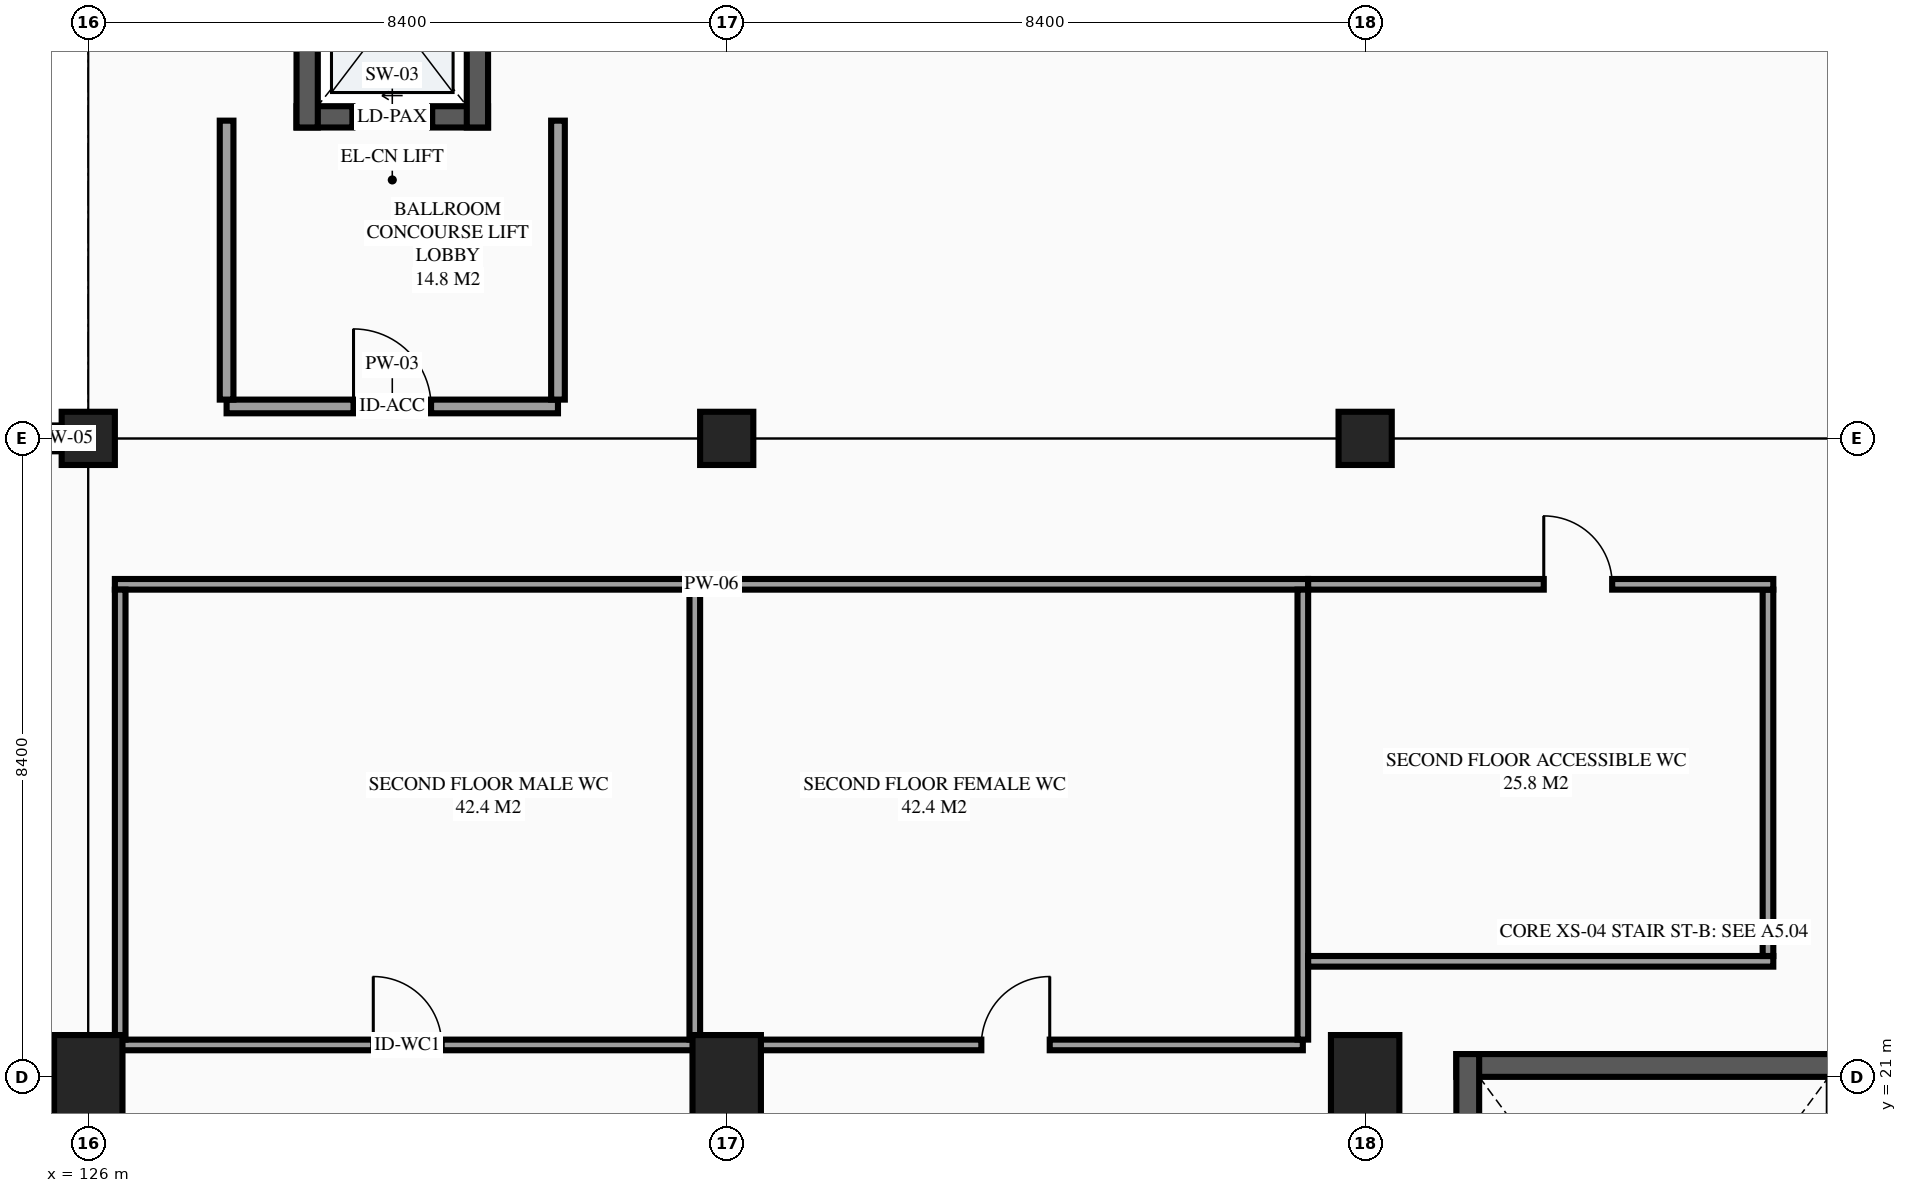
"""IFC4 building model, lengths in metres.
Left out: names, types, materials, properties, quantities, classifications, styles, units other than length and angle.
Written with IfcOpenShell. Run it as: python <this file> out.ifc"""

import sys

from ifc_helpers import new_model, si_unit, direction, frame, frame_2d, origin, origin_2d, place, context, subcontext, project, spatial, rectangle, extrude, element, fill, save


model = new_model("IFC4")
c1 = context("Model", 3, precision=1e-05, world=origin(), true_north=direction((0.0, 1.0)))
c2 = subcontext(c1, "Body", "Model", "MODEL_VIEW")
j1 = project(units=[si_unit("LENGTHUNIT", "METRE"), si_unit("PLANEANGLEUNIT", "RADIAN")], contexts=[c1])
p1 = place(None, origin())
s1 = spatial("IfcSite", under=j1, at=p1, CompositionType="ELEMENT")
p2 = place(p1, origin())
s2 = spatial("IfcBuilding", under=s1, at=p2, CompositionType="ELEMENT")
p3 = place(p2, frame((0.0, 0.0, 9.9)))
s3 = spatial("IfcBuildingStorey", under=s2, at=p3, CompositionType="ELEMENT", Elevation=9.9)
p4 = place(p3, frame((126.0, 21.0, 0.0), z_axis=(0.0, 0.0, 1.0), x_axis=(1.0, 0.0, 0.0)))
e1 = element("IfcColumn", 1, at=p4, inside=s3, PredefinedType="COLUMN", context=c2, shape_type="SweptSolid", body=[
    extrude(rectangle(XDim=0.9, YDim=1.1, at=origin_2d()), origin(), (0.0, 0.0, 1.0), 4.2),
])
p5 = place(p3, frame((126.0, 29.4, 0.0), z_axis=(0.0, 0.0, 1.0), x_axis=(1.0, 0.0, 0.0)))
e2 = element("IfcColumn", 2, at=p5, inside=s3, PredefinedType="COLUMN", context=c2, shape_type="SweptSolid", body=[
    extrude(rectangle(XDim=0.7, YDim=0.7, at=origin_2d()), origin(), (0.0, 0.0, 1.0), 4.2),
])
p6 = place(p3, frame((134.4, 21.0, 0.0), z_axis=(0.0, 0.0, 1.0), x_axis=(1.0, 0.0, 0.0)))
e3 = element("IfcColumn", 3, at=p6, inside=s3, PredefinedType="COLUMN", context=c2, shape_type="SweptSolid", body=[
    extrude(rectangle(XDim=0.9, YDim=1.1, at=origin_2d()), origin(), (0.0, 0.0, 1.0), 4.2),
])
p7 = place(p3, frame((134.4, 29.4, 0.0), z_axis=(0.0, 0.0, 1.0), x_axis=(1.0, 0.0, 0.0)))
e4 = element("IfcColumn", 4, at=p7, inside=s3, PredefinedType="COLUMN", context=c2, shape_type="SweptSolid", body=[
    extrude(rectangle(XDim=0.7, YDim=0.7, at=origin_2d()), origin(), (0.0, 0.0, 1.0), 4.2),
])
p8 = place(p3, frame((142.8, 21.0, 0.0), z_axis=(0.0, 0.0, 1.0), x_axis=(1.0, 0.0, 0.0)))
e5 = element("IfcColumn", 5, at=p8, inside=s3, PredefinedType="COLUMN", context=c2, shape_type="SweptSolid", body=[
    extrude(rectangle(XDim=0.9, YDim=1.1, at=origin_2d()), origin(), (0.0, 0.0, 1.0), 4.2),
])
p9 = place(p3, frame((142.8, 29.4, 0.0), z_axis=(0.0, 0.0, 1.0), x_axis=(1.0, 0.0, 0.0)))
e6 = element("IfcColumn", 6, at=p9, inside=s3, PredefinedType="COLUMN", context=c2, shape_type="SweptSolid", body=[
    extrude(rectangle(XDim=0.7, YDim=0.7, at=origin_2d()), origin(), (0.0, 0.0, 1.0), 4.2),
])
p10 = place(p3, frame((126.0, 29.4, 0.0), z_axis=(0.0, 0.0, 1.0), x_axis=(-1.0, 0.0, 0.0)))
e7 = element("IfcWall", 7, at=p10, inside=s3, PredefinedType="STANDARD", context=c2, shape_type="SweptSolid", body=[
    extrude(rectangle(XDim=0.6, YDim=0.34, at=frame_2d((0.3, 0.0))), origin(), (0.0, 0.0, 1.0), 4.2),
])
p11 = place(p3, frame((128.74, 33.63, 0.0), z_axis=(0.0, 0.0, 1.0), x_axis=(1.0, 0.0, 0.0)))
e8 = element("IfcWall", 8, at=p11, inside=s3, PredefinedType="SHEAR", context=c2, shape_type="SweptSolid", body=[
    extrude(rectangle(XDim=2.52, YDim=0.28, at=frame_2d((1.26, 0.0))), origin(), (0.0, 0.0, 1.0), 4.2),
])
p12 = place(p11, frame((0.735, 0.0, 0.0)))
e9 = element("IfcOpeningElement", 9, at=p12, cuts=e8, PredefinedType="OPENING", context=c2, shape_type="SweptSolid", body=[
    extrude(rectangle(XDim=1.05, YDim=2.2, at=frame_2d((0.525, 1.1))), frame((0.0, 0.15, 0.0), z_axis=(0.0, -1.0, 0.0), x_axis=(1.0, 0.0, 0.0)), (0.0, 0.0, 1.0), 0.3),
])
for number, where, z_axis, x_axis in (
    (10, (131.12, 33.49, 0.0), (0.0, 0.0, 1.0), (0.0, 1.0, 0.0)),
    (11, (128.88, 36.51, 0.0), (0.0, 0.0, 1.0), (0.0, -1.0, 0.0)),
):
    element("IfcWall", number, at=place(p3, frame(where, z_axis=z_axis, x_axis=x_axis)), inside=s3, PredefinedType="SHEAR", context=c2, shape_type="SweptSolid", body=[
        extrude(rectangle(XDim=3.02, YDim=0.28, at=frame_2d((1.51, 0.0))), origin(), (0.0, 0.0, 1.0), 4.2),
    ])
p13 = place(p3, frame((149.2, 21.15, 0.0), z_axis=(0.0, 0.0, 1.0), x_axis=(-1.0, 0.0, 0.0)))
e12 = element("IfcWall", 12, at=p13, inside=s3, PredefinedType="SHEAR", context=c2, shape_type="SweptSolid", body=[
    extrude(rectangle(XDim=5.2, YDim=0.3, at=frame_2d((2.6, 0.0))), origin(), (0.0, 0.0, 1.0), 4.2),
])
p14 = place(p3, frame((144.15, 21.3, 0.0), z_axis=(0.0, 0.0, 1.0), x_axis=(0.0, -1.0, 0.0)))
e13 = element("IfcWall", 13, at=p14, inside=s3, PredefinedType="SHEAR", context=c2, shape_type="SweptSolid", body=[
    extrude(rectangle(XDim=8.84, YDim=0.3, at=frame_2d((4.42, 0.0))), origin(), (0.0, 0.0, 1.0), 4.2),
])
p15 = place(p3, frame((126.35, 27.48, 0.0), z_axis=(0.0, 0.0, 1.0), x_axis=(1.0, 0.0, 0.0)))
e14 = element("IfcWall", 14, at=p15, inside=s3, PredefinedType="PARTITIONING", context=c2, shape_type="SweptSolid", body=[
    extrude(rectangle(XDim=15.7, YDim=0.14, at=frame_2d((7.85, 0.0))), origin(), (0.0, 0.0, 1.0), 3.955),
])
p16 = place(p3, frame((127.82, 29.82, 0.0), z_axis=(0.0, 0.0, 1.0), x_axis=(1.0, 0.0, 0.0)))
e15 = element("IfcWall", 15, at=p16, inside=s3, PredefinedType="PARTITIONING", context=c2, shape_type="SweptSolid", body=[
    extrude(rectangle(XDim=4.36, YDim=0.18, at=frame_2d((2.18, 0.0))), origin(), (0.0, 0.0, 1.0), 3.955),
])
p17 = place(p16, frame((1.67, 0.0, 0.0)))
e16 = element("IfcOpeningElement", 16, at=p17, cuts=e15, PredefinedType="OPENING", context=c2, shape_type="SweptSolid", body=[
    extrude(rectangle(XDim=1.02, YDim=2.15, at=frame_2d((0.51, 1.075))), frame((0.0, 0.1, 0.0), z_axis=(0.0, -1.0, 0.0), x_axis=(1.0, 0.0, 0.0)), (0.0, 0.0, 1.0), 0.2),
])
for number, where, z_axis, x_axis in (
    (17, (127.82, 29.91, 0.0), (0.0, 0.0, 1.0), (0.0, 1.0, 0.0)),
    (18, (132.18, 29.91, 0.0), (0.0, 0.0, 1.0), (0.0, 1.0, 0.0)),
):
    element("IfcWall", number, at=place(p3, frame(where, z_axis=z_axis, x_axis=x_axis)), inside=s3, PredefinedType="PARTITIONING", context=c2, shape_type="SweptSolid", body=[
        extrude(rectangle(XDim=3.67, YDim=0.18, at=frame_2d((1.835, 0.0))), origin(), (0.0, 0.0, 1.0), 3.955),
    ])
p18 = place(p3, frame((126.42, 21.42, 0.0), z_axis=(0.0, 0.0, 1.0), x_axis=(1.0, 0.0, 0.0)))
e19 = element("IfcWall", 19, at=p18, inside=s3, PredefinedType="PARTITIONING", context=c2, shape_type="SweptSolid", body=[
    extrude(rectangle(XDim=7.56, YDim=0.14, at=frame_2d((3.78, 0.0))), origin(), (0.0, 0.0, 1.0), 3.955),
])
p19 = place(p18, frame((3.33, 0.0, 0.0)))
e20 = element("IfcOpeningElement", 20, at=p19, cuts=e19, PredefinedType="OPENING", context=c2, shape_type="SweptSolid", body=[
    extrude(rectangle(XDim=0.9, YDim=2.12, at=frame_2d((0.45, 1.06))), frame((0.0, 0.08, 0.0), z_axis=(0.0, -1.0, 0.0), x_axis=(1.0, 0.0, 0.0)), (0.0, 0.0, 1.0), 0.16),
])
for number, where, z_axis, x_axis in (
    (21, (126.42, 21.49, 0.0), (0.0, 0.0, 1.0), (0.0, 1.0, 0.0)),
    (22, (133.98, 21.49, 0.0), (0.0, 0.0, 1.0), (0.0, 1.0, 0.0)),
):
    element("IfcWall", number, at=place(p3, frame(where, z_axis=z_axis, x_axis=x_axis)), inside=s3, PredefinedType="PARTITIONING", context=c2, shape_type="SweptSolid", body=[
        extrude(rectangle(XDim=5.92, YDim=0.14, at=frame_2d((2.96, 0.0))), origin(), (0.0, 0.0, 1.0), 3.955),
    ])
p20 = place(p3, frame((134.42, 21.42, 0.0), z_axis=(0.0, 0.0, 1.0), x_axis=(1.0, 0.0, 0.0)))
e23 = element("IfcWall", 23, at=p20, inside=s3, PredefinedType="PARTITIONING", context=c2, shape_type="SweptSolid", body=[
    extrude(rectangle(XDim=7.56, YDim=0.14, at=frame_2d((3.78, 0.0))), origin(), (0.0, 0.0, 1.0), 3.955),
])
p21 = place(p20, frame((3.33, 0.0, 0.0)))
e24 = element("IfcOpeningElement", 24, at=p21, cuts=e23, PredefinedType="OPENING", context=c2, shape_type="SweptSolid", body=[
    extrude(rectangle(XDim=0.9, YDim=2.12, at=frame_2d((0.45, 1.06))), frame((0.0, 0.08, 0.0), z_axis=(0.0, -1.0, 0.0), x_axis=(1.0, 0.0, 0.0)), (0.0, 0.0, 1.0), 0.16),
])
p22 = place(p3, frame((141.98, 21.49, 0.0), z_axis=(0.0, 0.0, 1.0), x_axis=(0.0, 1.0, 0.0)))
e25 = element("IfcWall", 25, at=p22, inside=s3, PredefinedType="PARTITIONING", context=c2, shape_type="SweptSolid", body=[
    extrude(rectangle(XDim=5.92, YDim=0.14, at=frame_2d((2.96, 0.0))), origin(), (0.0, 0.0, 1.0), 3.955),
])
p23 = place(p3, frame((142.05, 22.52, 0.0), z_axis=(0.0, 0.0, 1.0), x_axis=(1.0, 0.0, 0.0)))
e26 = element("IfcWall", 26, at=p23, inside=s3, PredefinedType="PARTITIONING", context=c2, shape_type="SweptSolid", body=[
    extrude(rectangle(XDim=6.12, YDim=0.14, at=frame_2d((3.06, 0.0))), origin(), (0.0, 0.0, 1.0), 3.955),
])
p24 = place(p3, frame((148.1, 22.59, 0.0), z_axis=(0.0, 0.0, 1.0), x_axis=(0.0, 1.0, 0.0)))
e27 = element("IfcWall", 27, at=p24, inside=s3, PredefinedType="PARTITIONING", context=c2, shape_type="SweptSolid", body=[
    extrude(rectangle(XDim=4.82, YDim=0.14, at=frame_2d((2.41, 0.0))), origin(), (0.0, 0.0, 1.0), 3.955),
])
p25 = place(p3, frame((142.05, 27.48, 0.0), z_axis=(0.0, 0.0, 1.0), x_axis=(1.0, 0.0, 0.0)))
e28 = element("IfcWall", 28, at=p25, inside=s3, PredefinedType="PARTITIONING", context=c2, shape_type="SweptSolid", body=[
    extrude(rectangle(XDim=6.12, YDim=0.14, at=frame_2d((3.06, 0.0))), origin(), (0.0, 0.0, 1.0), 3.955),
])
p26 = place(p25, frame((3.1, 0.0, 0.0)))
e29 = element("IfcOpeningElement", 29, at=p26, cuts=e28, PredefinedType="OPENING", context=c2, shape_type="SweptSolid", body=[
    extrude(rectangle(XDim=0.9, YDim=2.12, at=frame_2d((0.45, 1.06))), frame((0.0, 0.08, 0.0), z_axis=(0.0, -1.0, 0.0), x_axis=(1.0, 0.0, 0.0)), (0.0, 0.0, 1.0), 0.16),
])
p27 = place(p12, origin())
e30 = element("IfcDoor", 30, at=p27, inside=s3, OperationType="SLIDING_TO_LEFT", PredefinedType="DOOR", context=c2, shape_type="SweptSolid", body=[
    extrude(rectangle(XDim=1.05, YDim=2.2, at=frame_2d((0.525, 1.1))), frame((0.0, 0.025, 0.0), z_axis=(0.0, -1.0, 0.0), x_axis=(1.0, 0.0, 0.0)), (0.0, 0.0, 1.0), 0.05),
])
fill(e9, e30)
p28 = place(p17, origin())
e31 = element("IfcDoor", 31, at=p28, inside=s3, OperationType="SINGLE_SWING_LEFT", PredefinedType="DOOR", context=c2, shape_type="SweptSolid", body=[
    extrude(rectangle(XDim=1.02, YDim=2.15, at=frame_2d((0.51, 1.075))), frame((0.0, 0.025, 0.0), z_axis=(0.0, -1.0, 0.0), x_axis=(1.0, 0.0, 0.0)), (0.0, 0.0, 1.0), 0.05),
])
fill(e16, e31)
p29 = place(p19, origin())
e32 = element("IfcDoor", 32, at=p29, inside=s3, OperationType="SINGLE_SWING_LEFT", PredefinedType="DOOR", context=c2, shape_type="SweptSolid", body=[
    extrude(rectangle(XDim=0.9, YDim=2.12, at=frame_2d((0.45, 1.06))), frame((0.0, 0.025, 0.0), z_axis=(0.0, -1.0, 0.0), x_axis=(1.0, 0.0, 0.0)), (0.0, 0.0, 1.0), 0.05),
])
fill(e20, e32)
p30 = place(p21, origin())
e33 = element("IfcDoor", 33, at=p30, inside=s3, OperationType="SINGLE_SWING_RIGHT", PredefinedType="DOOR", context=c2, shape_type="SweptSolid", body=[
    extrude(rectangle(XDim=0.9, YDim=2.12, at=frame_2d((0.45, 1.06))), frame((0.0, 0.025, 0.0), z_axis=(0.0, -1.0, 0.0), x_axis=(1.0, 0.0, 0.0)), (0.0, 0.0, 1.0), 0.05),
])
fill(e24, e33)
p31 = place(p26, origin())
e34 = element("IfcDoor", 34, at=p31, inside=s3, OperationType="SINGLE_SWING_LEFT", PredefinedType="DOOR", context=c2, shape_type="SweptSolid", body=[
    extrude(rectangle(XDim=0.9, YDim=2.12, at=frame_2d((0.45, 1.06))), frame((0.0, 0.025, 0.0), z_axis=(0.0, -1.0, 0.0), x_axis=(1.0, 0.0, 0.0)), (0.0, 0.0, 1.0), 0.05),
])
fill(e29, e34)
save(model, sys.argv[1])
